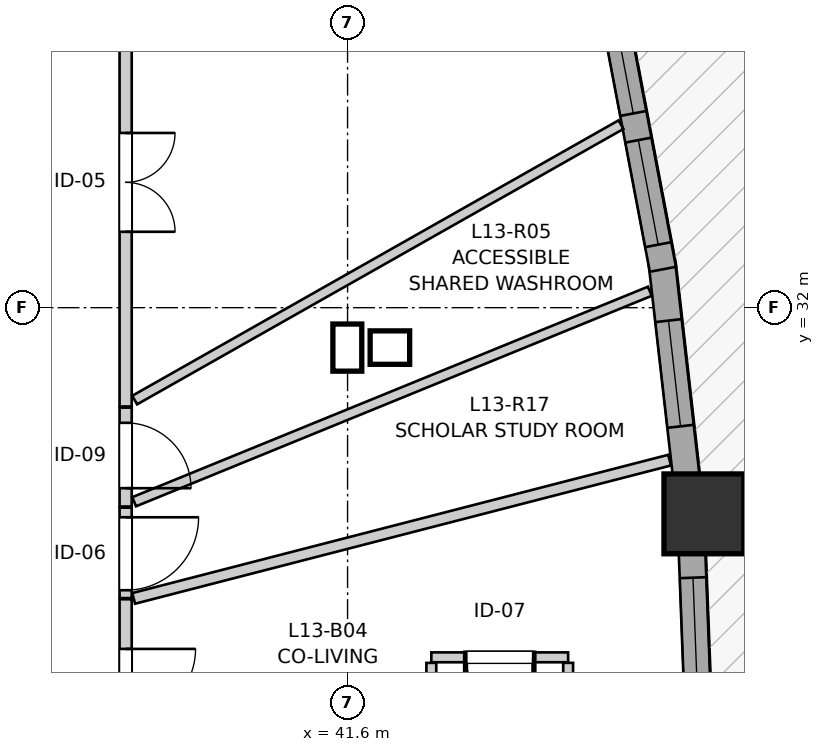
"""IFC4 building model, lengths in metres.
Left out: names, types, materials, properties, quantities, classifications, styles, units other than length and angle.
Written with IfcOpenShell. Run it as: python <this file> out.ifc"""

import sys

from ifc_helpers import new_model, si_unit, direction, frame, frame_2d, origin, origin_2d, place, context, subcontext, project, spatial, rectangle, extrude, source, transform, mapped, element, fill, save


model = new_model("IFC4")
c1 = context("Model", 3, precision=1e-05, world=origin(), true_north=direction((0.0, 1.0)))
c2 = subcontext(c1, "Body", "Model", "MODEL_VIEW")
j1 = project(units=[si_unit("LENGTHUNIT", "METRE"), si_unit("PLANEANGLEUNIT", "RADIAN")], contexts=[c1])
p1 = place(None, origin())
s1 = spatial("IfcSite", under=j1, at=p1, CompositionType="ELEMENT")
p2 = place(p1, origin())
s2 = spatial("IfcBuilding", under=s1, at=p2, CompositionType="ELEMENT")
p3 = place(p2, frame((0.0, 0.0, 46.2)))
s3 = spatial("IfcBuildingStorey", under=s2, at=p3, CompositionType="ELEMENT", Elevation=46.2)
m1 = source(origin(), c2, "Body", "SweptSolid", [
    extrude(rectangle(XDim=1.05, YDim=1.05, at=origin_2d()), origin(), (0.0, 0.0, 1.0), 2.94),
])
p4 = place(p3, frame((46.288, 29.287, 0.0), z_axis=(0.0, 0.0, 1.0), x_axis=(1.0, 0.0, 0.0)))
e1 = element("IfcColumn", 1, at=p4, inside=s3, PredefinedType="COLUMN", context=c2, shape_type="MappedRepresentation", body=[
    mapped(m1, transform((0.0, 0.0, 0.0), x_axis=(1.0, 0.0, 0.0), y_axis=(0.0, 1.0, 0.0), z_axis=(0.0, 0.0, 1.0), scale=1.0)),
])
p5 = place(p3, frame((46.24, 25.955, 0.0), z_axis=(0.0, 0.0, 1.0), x_axis=(-0.038058423581, 0.999275515759, 0.0)))
e2 = element("IfcWall", 2, at=p5, inside=s3, PredefinedType="SOLIDWALL", context=c2, shape_type="SweptSolid", body=[
    extrude(rectangle(XDim=3.028, YDim=0.35, at=frame_2d((1.514, 0.0))), origin(), (0.0, 0.0, 1.0), 2.42),
])
p6 = place(p5, frame((0.544, 0.0, 0.82)))
e3 = element("IfcOpeningElement", 3, at=p6, cuts=e2, PredefinedType="OPENING", context=c2, shape_type="SweptSolid", body=[
    extrude(rectangle(XDim=1.95, YDim=1.4, at=frame_2d((0.975, 0.7))), frame((0.0, 0.185, 0.0), z_axis=(0.0, -1.0, 0.0), x_axis=(1.0, 0.0, 0.0)), (0.0, 0.0, 1.0), 0.37),
])
p7 = place(p3, frame((46.08, 29.566, 0.0), z_axis=(0.0, 0.0, 1.0), x_axis=(-0.113307030468, 0.993560021763, 0.0)))
e4 = element("IfcWall", 4, at=p7, inside=s3, PredefinedType="SOLIDWALL", context=c2, shape_type="SweptSolid", body=[
    extrude(rectangle(XDim=3.047, YDim=0.35, at=frame_2d((1.523, 0.0))), origin(), (0.0, 0.0, 1.0), 2.42),
])
p8 = place(p7, frame((0.879, 0.0, 0.82)))
e5 = element("IfcOpeningElement", 5, at=p8, cuts=e4, PredefinedType="OPENING", context=c2, shape_type="SweptSolid", body=[
    extrude(rectangle(XDim=1.4, YDim=1.35, at=frame_2d((0.7, 0.675))), frame((0.0, 0.185, 0.0), z_axis=(0.0, -1.0, 0.0), x_axis=(1.0, 0.0, 0.0)), (0.0, 0.0, 1.0), 0.37),
])
p9 = place(p3, frame((45.749, 32.505, 0.0), z_axis=(0.0, 0.0, 1.0), x_axis=(-0.186645237066, 0.98242737924, 0.0)))
e6 = element("IfcWall", 6, at=p9, inside=s3, PredefinedType="SOLIDWALL", context=c2, shape_type="SweptSolid", body=[
    extrude(rectangle(XDim=3.364, YDim=0.35, at=frame_2d((1.682, 0.0))), origin(), (0.0, 0.0, 1.0), 2.42),
])
p10 = place(p9, frame((0.33, 0.0, 0.82)))
e7 = element("IfcOpeningElement", 7, at=p10, cuts=e6, PredefinedType="OPENING", context=c2, shape_type="SweptSolid", body=[
    extrude(rectangle(XDim=1.4, YDim=1.35, at=frame_2d((0.7, 0.675))), frame((0.0, 0.185, 0.0), z_axis=(0.0, -1.0, 0.0), x_axis=(1.0, 0.0, 0.0)), (0.0, 0.0, 1.0), 0.37),
])
p11 = place(p9, frame((2.087, 0.0, 0.82)))
e8 = element("IfcOpeningElement", 8, at=p11, cuts=e6, PredefinedType="OPENING", context=c2, shape_type="SweptSolid", body=[
    extrude(rectangle(XDim=0.95, YDim=1.35, at=frame_2d((0.475, 0.675))), frame((0.0, 0.185, 0.0), z_axis=(0.0, -1.0, 0.0), x_axis=(1.0, 0.0, 0.0)), (0.0, 0.0, 1.0), 0.37),
])
p12 = place(p3, frame((38.68, 36.58, 0.0), z_axis=(0.0, 0.0, 1.0), x_axis=(0.0, -1.0, 0.0)))
e9 = element("IfcWall", 9, at=p12, inside=s3, PredefinedType="PARTITIONING", context=c2, shape_type="SweptSolid", body=[
    extrude(rectangle(XDim=5.88, YDim=0.16, at=frame_2d((2.94, 0.0))), origin(), (0.0, 0.0, 1.0), 2.94),
])
p13 = place(p12, frame((2.281, 0.0, 0.0)))
e10 = element("IfcOpeningElement", 10, at=p13, cuts=e9, PredefinedType="OPENING", context=c2, shape_type="SweptSolid", body=[
    extrude(rectangle(XDim=1.3, YDim=2.1, at=frame_2d((0.65, 1.05))), frame((0.0, 0.09, 0.0), z_axis=(0.0, -1.0, 0.0), x_axis=(1.0, 0.0, 0.0)), (0.0, 0.0, 1.0), 0.18),
])
p14 = place(p3, frame((38.68, 28.164, 0.0), z_axis=(0.0, 0.0, 1.0), x_axis=(0.0, -1.0, 0.0)))
e11 = element("IfcWall", 11, at=p14, inside=s3, PredefinedType="PARTITIONING", context=c2, shape_type="SweptSolid", body=[
    extrude(rectangle(XDim=2.181, YDim=0.16, at=frame_2d((1.091, 0.0))), origin(), (0.0, 0.0, 1.0), 2.94),
])
p15 = place(p14, frame((0.654, 0.0, 0.0)))
e12 = element("IfcOpeningElement", 12, at=p15, cuts=e11, PredefinedType="OPENING", context=c2, shape_type="SweptSolid", body=[
    extrude(rectangle(XDim=0.92, YDim=2.1, at=frame_2d((0.46, 1.05))), frame((0.0, 0.09, 0.0), z_axis=(0.0, -1.0, 0.0), x_axis=(1.0, 0.0, 0.0)), (0.0, 0.0, 1.0), 0.18),
])
p16 = place(p3, frame((44.502, 27.4, 0.0), z_axis=(0.0, 0.0, 1.0), x_axis=(-1.0, 0.0, 0.0)))
e13 = element("IfcWall", 13, at=p16, inside=s3, PredefinedType="PARTITIONING", context=c2, shape_type="SweptSolid", body=[
    extrude(rectangle(XDim=1.8, YDim=0.13, at=frame_2d((0.9, 0.0))), origin(), (0.0, 0.0, 1.0), 2.94),
])
p17 = place(p16, frame((0.46, 0.0, 0.0)))
e14 = element("IfcOpeningElement", 14, at=p17, cuts=e13, PredefinedType="OPENING", context=c2, shape_type="SweptSolid", body=[
    extrude(rectangle(XDim=0.88, YDim=2.05, at=frame_2d((0.44, 1.025))), frame((0.0, 0.075, 0.0), z_axis=(0.0, -1.0, 0.0), x_axis=(1.0, 0.0, 0.0)), (0.0, 0.0, 1.0), 0.15),
])
p18 = place(p3, frame((38.68, 30.685, 0.0), z_axis=(0.0, 0.0, 1.0), x_axis=(0.0, -1.0, 0.0)))
e15 = element("IfcWall", 15, at=p18, inside=s3, PredefinedType="PARTITIONING", context=c2, shape_type="SweptSolid", body=[
    extrude(rectangle(XDim=1.301, YDim=0.16, at=frame_2d((0.65, 0.0))), origin(), (0.0, 0.0, 1.0), 2.94),
])
p19 = place(p18, frame((0.2, 0.0, 0.0)))
e16 = element("IfcOpeningElement", 16, at=p19, cuts=e15, PredefinedType="OPENING", context=c2, shape_type="SweptSolid", body=[
    extrude(rectangle(XDim=0.86, YDim=2.05, at=frame_2d((0.43, 1.025))), frame((0.0, 0.09, 0.0), z_axis=(0.0, -1.0, 0.0), x_axis=(1.0, 0.0, 0.0)), (0.0, 0.0, 1.0), 0.18),
])
p20 = place(p3, frame((38.68, 29.369, 0.0), z_axis=(0.0, 0.0, 1.0), x_axis=(0.0, -1.0, 0.0)))
e17 = element("IfcWall", 17, at=p20, inside=s3, PredefinedType="PARTITIONING", context=c2, shape_type="SweptSolid", body=[
    extrude(rectangle(XDim=1.19, YDim=0.16, at=frame_2d((0.595, 0.0))), origin(), (0.0, 0.0, 1.0), 2.94),
])
p21 = place(p20, frame((0.126, 0.0, 0.0)))
e18 = element("IfcOpeningElement", 18, at=p21, cuts=e17, PredefinedType="OPENING", context=c2, shape_type="SweptSolid", body=[
    extrude(rectangle(XDim=0.96, YDim=2.1, at=frame_2d((0.48, 1.05))), frame((0.0, 0.09, 0.0), z_axis=(0.0, -1.0, 0.0), x_axis=(1.0, 0.0, 0.0)), (0.0, 0.0, 1.0), 0.18),
])
p22 = place(p3, frame((38.799, 30.784, 0.0), z_axis=(0.0, 0.0, 1.0), x_axis=(0.870159349722, 0.492770439547, 0.0)))
e19 = element("IfcWall", 19, at=p22, inside=s3, PredefinedType="PARTITIONING", context=c2, shape_type="SweptSolid", body=[
    extrude(rectangle(XDim=7.353, YDim=0.13, at=frame_2d((3.676, 0.0))), origin(), (0.0, 0.0, 1.0), 2.94),
])
p23 = place(p3, frame((38.792, 29.447, 0.0), z_axis=(0.0, 0.0, 1.0), x_axis=(0.925857634668, 0.377872518618, 0.0)))
e20 = element("IfcWall", 20, at=p23, inside=s3, PredefinedType="PARTITIONING", context=c2, shape_type="SweptSolid", body=[
    extrude(rectangle(XDim=7.328, YDim=0.13, at=frame_2d((3.664, 0.0))), origin(), (0.0, 0.0, 1.0), 2.94),
])
p24 = place(p3, frame((38.786, 28.175, 0.0), z_axis=(0.0, 0.0, 1.0), x_axis=(0.96830505458, 0.249770537242, 0.0)))
e21 = element("IfcWall", 21, at=p24, inside=s3, PredefinedType="PARTITIONING", context=c2, shape_type="SweptSolid", body=[
    extrude(rectangle(XDim=7.282, YDim=0.145, at=frame_2d((3.641, 0.0))), origin(), (0.0, 0.0, 1.0), 2.94),
])
p25 = place(p3, frame((44.502, 26.001, 0.0), z_axis=(0.0, 0.0, 1.0), x_axis=(0.0, 1.0, 0.0)))
e22 = element("IfcWall", 22, at=p25, inside=s3, PredefinedType="PARTITIONING", context=c2, shape_type="SweptSolid", body=[
    extrude(rectangle(XDim=1.326, YDim=0.13, at=frame_2d((0.663, 0.0))), origin(), (0.0, 0.0, 1.0), 2.94),
])
p26 = place(p3, frame((42.702, 26.011, 0.0), z_axis=(0.0, 0.0, 1.0), x_axis=(0.0, 1.0, 0.0)))
e23 = element("IfcWall", 23, at=p26, inside=s3, PredefinedType="PARTITIONING", context=c2, shape_type="SweptSolid", body=[
    extrude(rectangle(XDim=1.316, YDim=0.13, at=frame_2d((0.658, 0.0))), origin(), (0.0, 0.0, 1.0), 2.94),
])
m2 = source(origin(), c2, "Body", "SweptSolid", [
    extrude(rectangle(XDim=1.95, YDim=1.4, at=frame_2d((0.975, 0.7))), frame((0.0, 0.03, 0.0), z_axis=(0.0, -1.0, 0.0), x_axis=(1.0, 0.0, 0.0)), (0.0, 0.0, 1.0), 0.06),
])
p27 = place(p6, origin())
e24 = element("IfcWindow", 24, at=p27, inside=s3, PartitioningType="SINGLE_PANEL", PredefinedType="WINDOW", context=c2, shape_type="MappedRepresentation", body=[
    mapped(m2, transform((0.0, 0.0, 0.0), x_axis=(1.0, 0.0, 0.0), y_axis=(0.0, 1.0, 0.0), z_axis=(0.0, 0.0, 1.0), scale=1.0)),
])
fill(e3, e24)
m3 = source(origin(), c2, "Body", "SweptSolid", [
    extrude(rectangle(XDim=1.4, YDim=1.35, at=frame_2d((0.7, 0.675))), frame((0.0, 0.03, 0.0), z_axis=(0.0, -1.0, 0.0), x_axis=(1.0, 0.0, 0.0)), (0.0, 0.0, 1.0), 0.06),
])
p28 = place(p8, origin())
e25 = element("IfcWindow", 25, at=p28, inside=s3, PartitioningType="SINGLE_PANEL", PredefinedType="WINDOW", context=c2, shape_type="MappedRepresentation", body=[
    mapped(m3, transform((0.0, 0.0, 0.0), x_axis=(1.0, 0.0, 0.0), y_axis=(0.0, 1.0, 0.0), z_axis=(0.0, 0.0, 1.0), scale=1.0)),
])
fill(e5, e25)
p29 = place(p10, origin())
e26 = element("IfcWindow", 26, at=p29, inside=s3, PartitioningType="SINGLE_PANEL", PredefinedType="WINDOW", context=c2, shape_type="MappedRepresentation", body=[
    mapped(m3, transform((0.0, 0.0, 0.0), x_axis=(1.0, 0.0, 0.0), y_axis=(0.0, 1.0, 0.0), z_axis=(0.0, 0.0, 1.0), scale=1.0)),
])
fill(e7, e26)
m4 = source(origin(), c2, "Body", "SweptSolid", [
    extrude(rectangle(XDim=0.95, YDim=1.35, at=frame_2d((0.475, 0.675))), frame((0.0, 0.03, 0.0), z_axis=(0.0, -1.0, 0.0), x_axis=(1.0, 0.0, 0.0)), (0.0, 0.0, 1.0), 0.06),
])
p30 = place(p11, origin())
e27 = element("IfcWindow", 27, at=p30, inside=s3, PartitioningType="SINGLE_PANEL", PredefinedType="WINDOW", context=c2, shape_type="MappedRepresentation", body=[
    mapped(m4, transform((0.0, 0.0, 0.0), x_axis=(1.0, 0.0, 0.0), y_axis=(0.0, 1.0, 0.0), z_axis=(0.0, 0.0, 1.0), scale=1.0)),
])
fill(e8, e27)
m5 = source(origin(), c2, "Body", "SweptSolid", [
    extrude(rectangle(XDim=1.3, YDim=2.1, at=frame_2d((0.65, 1.05))), frame((0.0, 0.025, 0.0), z_axis=(0.0, -1.0, 0.0), x_axis=(1.0, 0.0, 0.0)), (0.0, 0.0, 1.0), 0.05),
])
p31 = place(p13, origin())
e28 = element("IfcDoor", 28, at=p31, inside=s3, OperationType="DOUBLE_DOOR_SINGLE_SWING", PredefinedType="DOOR", context=c2, shape_type="MappedRepresentation", body=[
    mapped(m5, transform((0.0, 0.0, 0.0), x_axis=(1.0, 0.0, 0.0), y_axis=(0.0, 1.0, 0.0), z_axis=(0.0, 0.0, 1.0), scale=1.0)),
])
fill(e10, e28)
m6 = source(origin(), c2, "Body", "SweptSolid", [
    extrude(rectangle(XDim=0.92, YDim=2.1, at=frame_2d((0.46, 1.05))), frame((0.0, 0.025, 0.0), z_axis=(0.0, -1.0, 0.0), x_axis=(1.0, 0.0, 0.0)), (0.0, 0.0, 1.0), 0.05),
])
p32 = place(p15, origin())
e29 = element("IfcDoor", 29, at=p32, inside=s3, OperationType="SINGLE_SWING_LEFT", PredefinedType="DOOR", context=c2, shape_type="MappedRepresentation", body=[
    mapped(m6, transform((0.0, 0.0, 0.0), x_axis=(1.0, 0.0, 0.0), y_axis=(0.0, 1.0, 0.0), z_axis=(0.0, 0.0, 1.0), scale=1.0)),
])
fill(e12, e29)
m7 = source(origin(), c2, "Body", "SweptSolid", [
    extrude(rectangle(XDim=0.88, YDim=2.05, at=frame_2d((0.44, 1.025))), frame((0.0, 0.025, 0.0), z_axis=(0.0, -1.0, 0.0), x_axis=(1.0, 0.0, 0.0)), (0.0, 0.0, 1.0), 0.05),
])
p33 = place(p17, origin())
e30 = element("IfcDoor", 30, at=p33, inside=s3, OperationType="SINGLE_SWING_LEFT", PredefinedType="DOOR", context=c2, shape_type="MappedRepresentation", body=[
    mapped(m7, transform((0.0, 0.0, 0.0), x_axis=(1.0, 0.0, 0.0), y_axis=(0.0, 1.0, 0.0), z_axis=(0.0, 0.0, 1.0), scale=1.0)),
])
fill(e14, e30)
m8 = source(origin(), c2, "Body", "SweptSolid", [
    extrude(rectangle(XDim=0.86, YDim=2.05, at=frame_2d((0.43, 1.025))), frame((0.0, 0.025, 0.0), z_axis=(0.0, -1.0, 0.0), x_axis=(1.0, 0.0, 0.0)), (0.0, 0.0, 1.0), 0.05),
])
p34 = place(p19, origin())
e31 = element("IfcDoor", 31, at=p34, inside=s3, OperationType="SINGLE_SWING_RIGHT", PredefinedType="DOOR", context=c2, shape_type="MappedRepresentation", body=[
    mapped(m8, transform((0.0, 0.0, 0.0), x_axis=(1.0, 0.0, 0.0), y_axis=(0.0, 1.0, 0.0), z_axis=(0.0, 0.0, 1.0), scale=1.0)),
])
fill(e16, e31)
m9 = source(origin(), c2, "Body", "SweptSolid", [
    extrude(rectangle(XDim=0.96, YDim=2.1, at=frame_2d((0.48, 1.05))), frame((0.0, 0.025, 0.0), z_axis=(0.0, -1.0, 0.0), x_axis=(1.0, 0.0, 0.0)), (0.0, 0.0, 1.0), 0.05),
])
p35 = place(p21, origin())
e32 = element("IfcDoor", 32, at=p35, inside=s3, OperationType="SINGLE_SWING_LEFT", PredefinedType="DOOR", context=c2, shape_type="MappedRepresentation", body=[
    mapped(m9, transform((0.0, 0.0, 0.0), x_axis=(1.0, 0.0, 0.0), y_axis=(0.0, 1.0, 0.0), z_axis=(0.0, 0.0, 1.0), scale=1.0)),
])
fill(e18, e32)
save(model, sys.argv[1])
